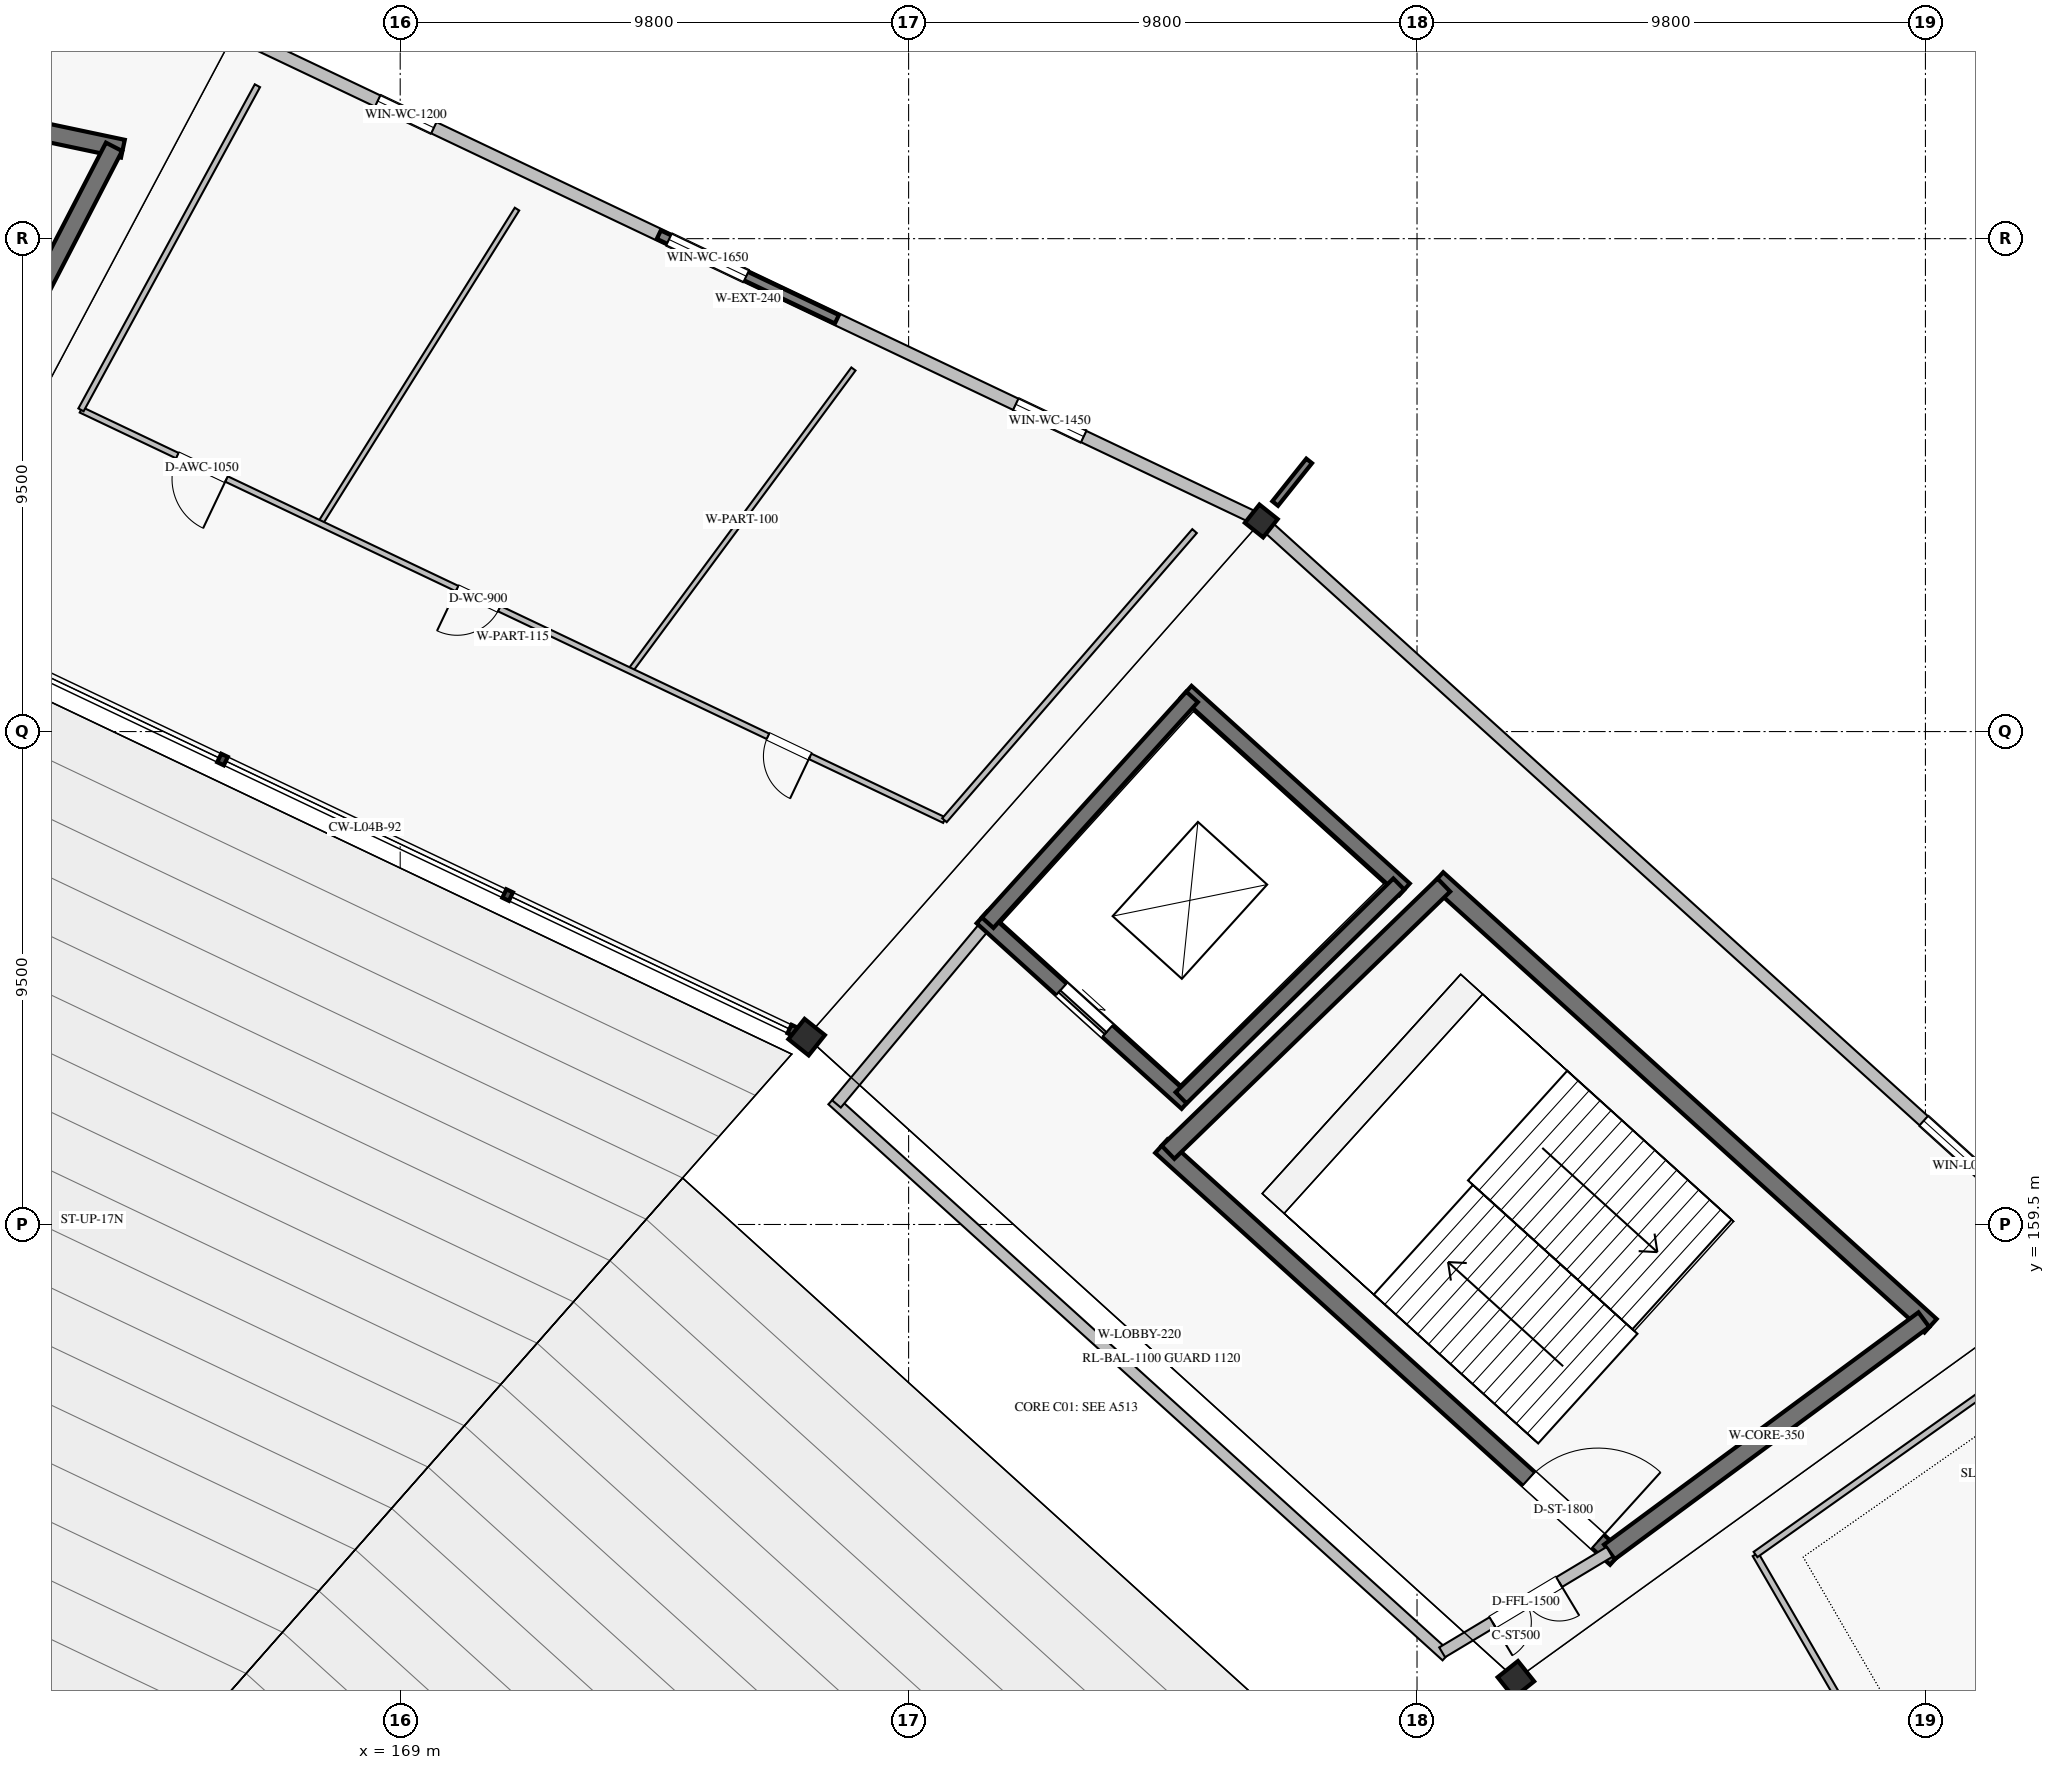
"""IFC4 building model, lengths in metres.
Left out: names, types, materials, properties, quantities, classifications, styles, units other than length and angle.
Written with IfcOpenShell. Run it as: python <this file> out.ifc"""

import sys

from ifc_helpers import new_model, si_unit, direction, frame, frame_2d, origin, origin_2d, place, context, subcontext, project, spatial, rectangle, hollow_rectangle, extrude, element, fill, save


model = new_model("IFC4")
c1 = context("Model", 3, precision=1e-05, world=origin(), true_north=direction((0.0, 1.0)))
c2 = subcontext(c1, "Body", "Model", "MODEL_VIEW")
j1 = project(units=[si_unit("LENGTHUNIT", "METRE"), si_unit("PLANEANGLEUNIT", "RADIAN")], contexts=[c1])
p1 = place(None, origin())
s1 = spatial("IfcSite", under=j1, at=p1, CompositionType="ELEMENT")
p2 = place(p1, origin())
s2 = spatial("IfcBuilding", under=s1, at=p2, CompositionType="ELEMENT")
p3 = place(p2, frame((0.0, 0.0, 20.4)))
s3 = spatial("IfcBuildingStorey", under=s2, at=p3, CompositionType="ELEMENT", Elevation=20.4)
for number, where, z_axis, x_axis in (
    (1, (190.506, 150.734, 0.0), (0.0, 0.0, 1.0), (0.782, 0.623, 0.0)),
    (2, (176.834, 163.111, 0.0), (0.0, 0.0, 1.0), (0.623, 0.782, 0.0)),
):
    element("IfcColumn", number, at=place(p3, frame(where, z_axis=z_axis, x_axis=x_axis)), inside=s3, PredefinedType="COLUMN", context=c2, shape_type="SweptSolid", body=[
        extrude(hollow_rectangle(XDim=0.5, YDim=0.5, WallThickness=0.022, at=origin_2d()), origin(), (0.0, 0.0, 1.0), 5.44),
    ])
p4 = place(p3, frame((185.598, 173.059, 0.0), z_axis=(0.0, 0.0, 1.0), x_axis=(0.623489801853, 0.781831482473, 0.0)))
e3 = element("IfcColumn", 3, at=p4, inside=s3, PredefinedType="COLUMN", context=c2, shape_type="SweptSolid", body=[
    extrude(hollow_rectangle(XDim=0.45, YDim=0.45, WallThickness=0.022, at=origin_2d()), origin(), (0.0, 0.0, 1.0), 5.44),
])
p5 = place(p3, frame((201.332, 158.815, 0.0), z_axis=(0.0, 0.0, 1.0), x_axis=(-0.741349049196, 0.671119651967, 0.0)))
e4 = element("IfcWall", 4, at=p5, inside=s3, PredefinedType="SOLIDWALL", context=c2, shape_type="SweptSolid", body=[
    extrude(rectangle(XDim=21.004, YDim=0.24, at=frame_2d((10.502, 0.0))), origin(), (0.0, 0.0, 1.0), 4.53),
])
p6 = place(p5, frame((1.4, 0.0, 1.0)))
e5 = element("IfcOpeningElement", 5, at=p6, cuts=e4, PredefinedType="OPENING", context=c2, shape_type="SweptSolid", body=[
    extrude(rectangle(XDim=2.6, YDim=1.8, at=frame_2d((1.3, 0.9))), frame((0.0, 0.13, 0.0), z_axis=(0.0, -1.0, 0.0), x_axis=(1.0, 0.0, 0.0)), (0.0, 0.0, 1.0), 0.26),
])
p7 = place(p3, frame((185.399, 173.153, 0.0), z_axis=(0.0, 0.0, 1.0), x_axis=(-0.90321305417, 0.42919247288, 0.0)))
e6 = element("IfcWall", 6, at=p7, inside=s3, PredefinedType="SOLIDWALL", context=c2, shape_type="SweptSolid", body=[
    extrude(rectangle(XDim=21.474, YDim=0.24, at=frame_2d((10.737, 0.0))), origin(), (0.0, 0.0, 1.0), 4.53),
])
p8 = place(p7, frame((3.57, 0.0, 1.65)))
e7 = element("IfcOpeningElement", 7, at=p8, cuts=e6, PredefinedType="OPENING", context=c2, shape_type="SweptSolid", body=[
    extrude(rectangle(XDim=1.45, YDim=0.95, at=frame_2d((0.725, 0.475))), frame((0.0, 0.13, 0.0), z_axis=(0.0, -1.0, 0.0), x_axis=(1.0, 0.0, 0.0)), (0.0, 0.0, 1.0), 0.26),
])
p9 = place(p7, frame((10.771, 0.0, 1.65)))
e8 = element("IfcOpeningElement", 8, at=p9, cuts=e6, PredefinedType="OPENING", context=c2, shape_type="SweptSolid", body=[
    extrude(rectangle(XDim=1.65, YDim=1.0, at=frame_2d((0.825, 0.5))), frame((0.0, 0.13, 0.0), z_axis=(0.0, -1.0, 0.0), x_axis=(1.0, 0.0, 0.0)), (0.0, 0.0, 1.0), 0.26),
])
p10 = place(p7, frame((17.438, 0.0, 1.65)))
e9 = element("IfcOpeningElement", 9, at=p10, cuts=e6, PredefinedType="OPENING", context=c2, shape_type="SweptSolid", body=[
    extrude(rectangle(XDim=1.2, YDim=0.9, at=frame_2d((0.6, 0.45))), frame((0.0, 0.13, 0.0), z_axis=(0.0, -1.0, 0.0), x_axis=(1.0, 0.0, 0.0)), (0.0, 0.0, 1.0), 0.26),
])
p11 = place(p3, frame((192.439, 153.072, 0.0), z_axis=(0.0, 0.0, 1.0), x_axis=(-0.741358227035, 0.671109513572, 0.0)))
e10 = element("IfcWall", 10, at=p11, inside=s3, PredefinedType="SHEAR", context=c2, shape_type="SweptSolid", body=[
    extrude(rectangle(XDim=11.827, YDim=0.35, at=frame_2d((5.913, 0.0))), origin(), (0.0, 0.0, 1.0), 5.18),
])
p12 = place(p11, frame((0.475, 0.0, 0.0)))
e11 = element("IfcOpeningElement", 11, at=p12, cuts=e10, PredefinedType="OPENING", context=c2, shape_type="SweptSolid", body=[
    extrude(rectangle(XDim=1.8, YDim=2.2, at=frame_2d((0.9, 1.1))), frame((0.0, 0.185, 0.0), z_axis=(0.0, -1.0, 0.0), x_axis=(1.0, 0.0, 0.0)), (0.0, 0.0, 1.0), 0.37),
])
p13 = place(p3, frame((198.499, 157.548, 0.0), z_axis=(0.0, 0.0, 1.0), x_axis=(-0.741351373721, 0.671117084183, 0.0)))
e12 = element("IfcWall", 12, at=p13, inside=s3, PredefinedType="SHEAR", context=c2, shape_type="SweptSolid", body=[
    extrude(rectangle(XDim=12.83, YDim=0.35, at=frame_2d((6.415, 0.0))), origin(), (0.0, 0.0, 1.0), 5.18),
])
p14 = place(p3, frame((192.309, 153.189, 0.0), z_axis=(0.0, 0.0, 1.0), x_axis=(0.804395625347, 0.594093997548, 0.0)))
e13 = element("IfcWall", 13, at=p14, inside=s3, PredefinedType="SHEAR", context=c2, shape_type="SweptSolid", body=[
    extrude(rectangle(XDim=7.534, YDim=0.35, at=frame_2d((3.767, 0.0))), origin(), (0.0, 0.0, 1.0), 5.18),
])
p15 = place(p3, frame((183.801, 160.892, 0.0), z_axis=(0.0, 0.0, 1.0), x_axis=(0.718297398554, 0.69573619083, 0.0)))
e14 = element("IfcWall", 14, at=p15, inside=s3, PredefinedType="SHEAR", context=c2, shape_type="SweptSolid", body=[
    extrude(rectangle(XDim=7.402, YDim=0.35, at=frame_2d((3.701, 0.0))), origin(), (0.0, 0.0, 1.0), 5.18),
])
p16 = place(p3, frame((184.163, 161.841, 0.0), z_axis=(0.0, 0.0, 1.0), x_axis=(-0.741350155641, 0.671118429736, 0.0)))
e15 = element("IfcWall", 15, at=p16, inside=s3, PredefinedType="SHEAR", context=c2, shape_type="SweptSolid", body=[
    extrude(rectangle(XDim=5.329, YDim=0.3, at=frame_2d((2.665, 0.0))), origin(), (0.0, 0.0, 1.0), 5.18),
])
p17 = place(p16, frame((2.065, 0.0, 0.0)))
e16 = element("IfcOpeningElement", 16, at=p17, cuts=e15, PredefinedType="OPENING", context=c2, shape_type="SweptSolid", body=[
    extrude(rectangle(XDim=1.2, YDim=2.2, at=frame_2d((0.6, 1.1))), frame((0.0, 0.16, 0.0), z_axis=(0.0, -1.0, 0.0), x_axis=(1.0, 0.0, 0.0)), (0.0, 0.0, 1.0), 0.32),
])
p18 = place(p3, frame((188.36, 165.961, 0.0), z_axis=(0.0, 0.0, 1.0), x_axis=(-0.74134208775, 0.671127341815, 0.0)))
e17 = element("IfcWall", 17, at=p18, inside=s3, PredefinedType="SHEAR", context=c2, shape_type="SweptSolid", body=[
    extrude(rectangle(XDim=5.675, YDim=0.3, at=frame_2d((2.837, 0.0))), origin(), (0.0, 0.0, 1.0), 5.18),
])
p19 = place(p3, frame((184.052, 161.941, 0.0), z_axis=(0.0, 0.0, 1.0), x_axis=(0.713553028001, 0.700601224828, 0.0)))
e18 = element("IfcWall", 18, at=p19, inside=s3, PredefinedType="SHEAR", context=c2, shape_type="SweptSolid", body=[
    extrude(rectangle(XDim=5.881, YDim=0.3, at=frame_2d((2.94, 0.0))), origin(), (0.0, 0.0, 1.0), 5.18),
])
p20 = place(p3, frame((180.324, 165.316, 0.0), z_axis=(0.0, 0.0, 1.0), x_axis=(0.67115829282, 0.741314067031, 0.0)))
e19 = element("IfcWall", 19, at=p20, inside=s3, PredefinedType="SHEAR", context=c2, shape_type="SweptSolid", body=[
    extrude(rectangle(XDim=5.871, YDim=0.3, at=frame_2d((2.935, 0.0))), origin(), (0.0, 0.0, 1.0), 5.18),
])
p21 = place(p3, frame((189.166, 151.181, 0.0), z_axis=(0.0, 0.0, 1.0), x_axis=(-0.741351035574, 0.671117457717, 0.0)))
e20 = element("IfcWall", 20, at=p21, inside=s3, PredefinedType="SOLIDWALL", context=c2, shape_type="SweptSolid", body=[
    extrude(rectangle(XDim=15.969, YDim=0.22, at=frame_2d((7.985, 0.0))), origin(), (0.0, 0.0, 1.0), 5.18),
])
p22 = place(p3, frame((189.085, 151.254, 0.0), z_axis=(0.0, 0.0, 1.0), x_axis=(0.857424171966, 0.514610327654, 0.0)))
e21 = element("IfcWall", 21, at=p22, inside=s3, PredefinedType="SOLIDWALL", context=c2, shape_type="SweptSolid", body=[
    extrude(rectangle(XDim=3.76, YDim=0.22, at=frame_2d((1.88, 0.0))), origin(), (0.0, 0.0, 1.0), 5.18),
])
p23 = place(p22, frame((1.13, 0.0, 0.0)))
e22 = element("IfcOpeningElement", 22, at=p23, cuts=e21, PredefinedType="OPENING", context=c2, shape_type="SweptSolid", body=[
    extrude(rectangle(XDim=1.5, YDim=2.2, at=frame_2d((0.75, 1.1))), frame((0.0, 0.12, 0.0), z_axis=(0.0, -1.0, 0.0), x_axis=(1.0, 0.0, 0.0)), (0.0, 0.0, 1.0), 0.24),
])
p24 = place(p3, frame((177.409, 161.824, 0.0), z_axis=(0.0, 0.0, 1.0), x_axis=(0.640759627034, 0.767741558315, 0.0)))
e23 = element("IfcWall", 23, at=p24, inside=s3, PredefinedType="SOLIDWALL", context=c2, shape_type="SweptSolid", body=[
    extrude(rectangle(XDim=4.549, YDim=0.22, at=frame_2d((2.274, 0.0))), origin(), (0.0, 0.0, 1.0), 5.18),
])
p25 = place(p3, frame((163.655, 180.233, 0.0), z_axis=(0.0, 0.0, 1.0), x_axis=(-0.978345119536, 0.206980257705, 0.0)))
e24 = element("IfcWall", 24, at=p25, inside=s3, PredefinedType="SHEAR", context=c2, shape_type="SweptSolid", body=[
    extrude(rectangle(XDim=13.067, YDim=0.35, at=frame_2d((6.533, 0.0))), origin(), (0.0, 0.0, 1.0), 5.18),
])
p26 = place(p3, frame((160.229, 173.976, 0.0), z_axis=(0.0, 0.0, 1.0), x_axis=(0.459409796564, 0.888224430435, 0.0)))
e25 = element("IfcWall", 25, at=p26, inside=s3, PredefinedType="SHEAR", context=c2, shape_type="SweptSolid", body=[
    extrude(rectangle(XDim=7.086, YDim=0.35, at=frame_2d((3.543, 0.0))), origin(), (0.0, 0.0, 1.0), 5.18),
])
p27 = place(p3, frame((203.861, 138.072, 0.0), z_axis=(0.0, 0.0, 1.0), x_axis=(-0.501622425841, 0.865086667273, 0.0)))
e26 = element("IfcWall", 26, at=p27, inside=s3, PredefinedType="PARTITIONING", context=c2, shape_type="SweptSolid", body=[
    extrude(rectangle(XDim=17.417, YDim=0.125, at=frame_2d((8.708, 0.0))), origin(), (0.0, 0.0, 1.0), 4.5),
])
p28 = place(p27, frame((8.198, 0.0, 0.0)))
e27 = element("IfcOpeningElement", 27, at=p28, cuts=e26, PredefinedType="OPENING", context=c2, shape_type="SweptSolid", body=[
    extrude(rectangle(XDim=1.02, YDim=2.1, at=frame_2d((0.51, 1.05))), frame((0.0, 0.073, 0.0), z_axis=(0.0, -1.0, 0.0), x_axis=(1.0, 0.0, 0.0)), (0.0, 0.0, 1.0), 0.145),
])
p29 = place(p3, frame((195.125, 153.139, 0.0), z_axis=(0.0, 0.0, 1.0), x_axis=(0.815757317426, 0.578394328348, 0.0)))
e28 = element("IfcWall", 28, at=p29, inside=s3, PredefinedType="PARTITIONING", context=c2, shape_type="SweptSolid", body=[
    extrude(rectangle(XDim=7.545, YDim=0.125, at=frame_2d((3.773, 0.0))), origin(), (0.0, 0.0, 1.0), 4.5),
])
p30 = place(p3, frame((179.491, 167.292, 0.0), z_axis=(0.0, 0.0, 1.0), x_axis=(-0.90321677741, 0.429184637429, 0.0)))
e29 = element("IfcWall", 29, at=p30, inside=s3, PredefinedType="PARTITIONING", context=c2, shape_type="SweptSolid", body=[
    extrude(rectangle(XDim=18.427, YDim=0.115, at=frame_2d((9.214, 0.0))), origin(), (0.0, 0.0, 1.0), 4.5),
])
p31 = place(p30, frame((2.867, 0.0, 0.0)))
e30 = element("IfcOpeningElement", 30, at=p31, cuts=e29, PredefinedType="OPENING", context=c2, shape_type="SweptSolid", body=[
    extrude(rectangle(XDim=0.9, YDim=2.1, at=frame_2d((0.45, 1.05))), frame((0.0, 0.067, 0.0), z_axis=(0.0, -1.0, 0.0), x_axis=(1.0, 0.0, 0.0)), (0.0, 0.0, 1.0), 0.135),
])
p32 = place(p30, frame((9.501, 0.0, 0.0)))
e31 = element("IfcOpeningElement", 31, at=p32, cuts=e29, PredefinedType="OPENING", context=c2, shape_type="SweptSolid", body=[
    extrude(rectangle(XDim=0.9, YDim=2.1, at=frame_2d((0.45, 1.05))), frame((0.0, 0.067, 0.0), z_axis=(0.0, -1.0, 0.0), x_axis=(1.0, 0.0, 0.0)), (0.0, 0.0, 1.0), 0.135),
])
p33 = place(p30, frame((15.322, 0.0, 0.0)))
e32 = element("IfcOpeningElement", 32, at=p33, cuts=e29, PredefinedType="OPENING", context=c2, shape_type="SweptSolid", body=[
    extrude(rectangle(XDim=1.05, YDim=2.1, at=frame_2d((0.525, 1.05))), frame((0.0, 0.067, 0.0), z_axis=(0.0, -1.0, 0.0), x_axis=(1.0, 0.0, 0.0)), (0.0, 0.0, 1.0), 0.135),
])
p34 = place(p3, frame((179.491, 167.292, 0.0), z_axis=(0.0, 0.0, 1.0), x_axis=(0.654288201841, 0.7562452968, 0.0)))
e33 = element("IfcWall", 33, at=p34, inside=s3, PredefinedType="PARTITIONING", context=c2, shape_type="SweptSolid", body=[
    extrude(rectangle(XDim=7.368, YDim=0.115, at=frame_2d((3.684, 0.0))), origin(), (0.0, 0.0, 1.0), 4.5),
])
p35 = place(p3, frame((162.847, 175.2, 0.0), z_axis=(0.0, 0.0, 1.0), x_axis=(0.47812325427, 0.878292749444, 0.0)))
e34 = element("IfcWall", 34, at=p35, inside=s3, PredefinedType="PARTITIONING", context=c2, shape_type="SweptSolid", body=[
    extrude(rectangle(XDim=7.113, YDim=0.115, at=frame_2d((3.556, 0.0))), origin(), (0.0, 0.0, 1.0), 4.5),
])
p36 = place(p3, frame((173.433, 170.17, 0.0), z_axis=(0.0, 0.0, 1.0), x_axis=(0.59474577564, 0.803913840134, 0.0)))
e35 = element("IfcWall", 35, at=p36, inside=s3, PredefinedType="PARTITIONING", context=c2, shape_type="SweptSolid", body=[
    extrude(rectangle(XDim=7.237, YDim=0.1, at=frame_2d((3.618, 0.0))), origin(), (0.0, 0.0, 1.0), 4.5),
])
p37 = place(p3, frame((167.458, 173.01, 0.0), z_axis=(0.0, 0.0, 1.0), x_axis=(0.530658716889, 0.847585586351, 0.0)))
e36 = element("IfcWall", 36, at=p37, inside=s3, PredefinedType="PARTITIONING", context=c2, shape_type="SweptSolid", body=[
    extrude(rectangle(XDim=7.149, YDim=0.1, at=frame_2d((3.575, 0.0))), origin(), (0.0, 0.0, 1.0), 4.5),
])
p38 = place(p6, origin())
e37 = element("IfcWindow", 37, at=p38, inside=s3, PartitioningType="SINGLE_PANEL", PredefinedType="WINDOW", context=c2, shape_type="SweptSolid", body=[
    extrude(rectangle(XDim=2.6, YDim=1.8, at=frame_2d((1.3, 0.9))), frame((0.0, 0.03, 0.0), z_axis=(0.0, -1.0, 0.0), x_axis=(1.0, 0.0, 0.0)), (0.0, 0.0, 1.0), 0.06),
])
fill(e5, e37)
p39 = place(p8, origin())
e38 = element("IfcWindow", 38, at=p39, inside=s3, PartitioningType="SINGLE_PANEL", PredefinedType="WINDOW", context=c2, shape_type="SweptSolid", body=[
    extrude(rectangle(XDim=1.45, YDim=0.95, at=frame_2d((0.725, 0.475))), frame((0.0, 0.03, 0.0), z_axis=(0.0, -1.0, 0.0), x_axis=(1.0, 0.0, 0.0)), (0.0, 0.0, 1.0), 0.06),
])
fill(e7, e38)
p40 = place(p9, origin())
e39 = element("IfcWindow", 39, at=p40, inside=s3, PartitioningType="SINGLE_PANEL", PredefinedType="WINDOW", context=c2, shape_type="SweptSolid", body=[
    extrude(rectangle(XDim=1.65, YDim=1.0, at=frame_2d((0.825, 0.5))), frame((0.0, 0.03, 0.0), z_axis=(0.0, -1.0, 0.0), x_axis=(1.0, 0.0, 0.0)), (0.0, 0.0, 1.0), 0.06),
])
fill(e8, e39)
p41 = place(p10, origin())
e40 = element("IfcWindow", 40, at=p41, inside=s3, PartitioningType="SINGLE_PANEL", PredefinedType="WINDOW", context=c2, shape_type="SweptSolid", body=[
    extrude(rectangle(XDim=1.2, YDim=0.9, at=frame_2d((0.6, 0.45))), frame((0.0, 0.03, 0.0), z_axis=(0.0, -1.0, 0.0), x_axis=(1.0, 0.0, 0.0)), (0.0, 0.0, 1.0), 0.06),
])
fill(e9, e40)
p42 = place(p12, frame((1.8, 0.0, 0.0), z_axis=(0.0, 0.0, 1.0), x_axis=(-1.0, 0.0, 0.0)))
e41 = element("IfcDoor", 41, at=p42, inside=s3, OperationType="SINGLE_SWING_RIGHT", PredefinedType="DOOR", context=c2, shape_type="SweptSolid", body=[
    extrude(rectangle(XDim=1.8, YDim=2.2, at=frame_2d((0.9, 1.1))), frame((0.0, 0.025, 0.0), z_axis=(0.0, -1.0, 0.0), x_axis=(1.0, 0.0, 0.0)), (0.0, 0.0, 1.0), 0.05),
])
fill(e11, e41)
p43 = place(p17, origin())
e42 = element("IfcDoor", 42, at=p43, inside=s3, OperationType="SLIDING_TO_LEFT", PredefinedType="DOOR", context=c2, shape_type="SweptSolid", body=[
    extrude(rectangle(XDim=1.2, YDim=2.2, at=frame_2d((0.6, 1.1))), frame((0.0, 0.025, 0.0), z_axis=(0.0, -1.0, 0.0), x_axis=(1.0, 0.0, 0.0)), (0.0, 0.0, 1.0), 0.05),
])
fill(e16, e42)
p44 = place(p23, frame((1.5, 0.0, 0.0), z_axis=(0.0, 0.0, 1.0), x_axis=(-1.0, 0.0, 0.0)))
e43 = element("IfcDoor", 43, at=p44, inside=s3, OperationType="DOUBLE_DOOR_SINGLE_SWING", PredefinedType="DOOR", context=c2, shape_type="SweptSolid", body=[
    extrude(rectangle(XDim=1.5, YDim=2.2, at=frame_2d((0.75, 1.1))), frame((0.0, 0.025, 0.0), z_axis=(0.0, -1.0, 0.0), x_axis=(1.0, 0.0, 0.0)), (0.0, 0.0, 1.0), 0.05),
])
fill(e22, e43)
p45 = place(p31, origin())
e44 = element("IfcDoor", 44, at=p45, inside=s3, OperationType="SINGLE_SWING_LEFT", PredefinedType="DOOR", context=c2, shape_type="SweptSolid", body=[
    extrude(rectangle(XDim=0.9, YDim=2.1, at=frame_2d((0.45, 1.05))), frame((0.0, 0.025, 0.0), z_axis=(0.0, -1.0, 0.0), x_axis=(1.0, 0.0, 0.0)), (0.0, 0.0, 1.0), 0.05),
])
fill(e30, e44)
p46 = place(p32, origin())
e45 = element("IfcDoor", 45, at=p46, inside=s3, OperationType="SINGLE_SWING_RIGHT", PredefinedType="DOOR", context=c2, shape_type="SweptSolid", body=[
    extrude(rectangle(XDim=0.9, YDim=2.1, at=frame_2d((0.45, 1.05))), frame((0.0, 0.025, 0.0), z_axis=(0.0, -1.0, 0.0), x_axis=(1.0, 0.0, 0.0)), (0.0, 0.0, 1.0), 0.05),
])
fill(e31, e45)
p47 = place(p33, origin())
e46 = element("IfcDoor", 46, at=p47, inside=s3, OperationType="SINGLE_SWING_LEFT", PredefinedType="DOOR", context=c2, shape_type="SweptSolid", body=[
    extrude(rectangle(XDim=1.05, YDim=2.1, at=frame_2d((0.525, 1.05))), frame((0.0, 0.025, 0.0), z_axis=(0.0, -1.0, 0.0), x_axis=(1.0, 0.0, 0.0)), (0.0, 0.0, 1.0), 0.05),
])
fill(e32, e46)
save(model, sys.argv[1])
